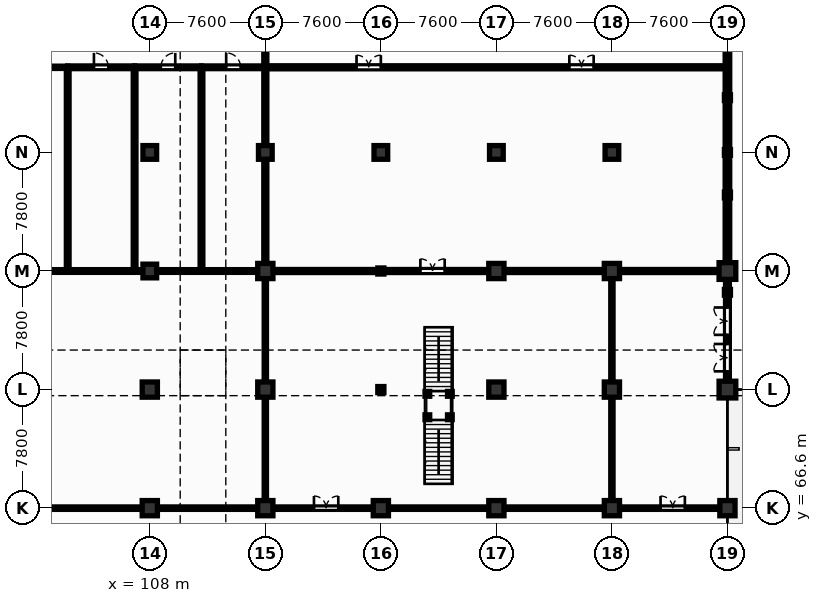
"""IFC4 building model, lengths in metres.
Left out: names, types, materials, properties, quantities, classifications, styles, units other than length and angle.
Written with IfcOpenShell. Run it as: python <this file> out.ifc"""

import sys

from ifc_helpers import new_model, si_unit, direction, frame, frame_2d, origin, origin_2d, place, context, subcontext, project, spatial, rectangle, i_section, extrude, element, fill, save


model = new_model("IFC4")
c1 = context("Model", 3, precision=1e-05, world=origin(), true_north=direction((0.0, 1.0)))
c2 = subcontext(c1, "Body", "Model", "MODEL_VIEW")
j1 = project(units=[si_unit("LENGTHUNIT", "METRE"), si_unit("PLANEANGLEUNIT", "RADIAN")], contexts=[c1])
p1 = place(None, origin())
s1 = spatial("IfcSite", under=j1, at=p1, CompositionType="ELEMENT")
p2 = place(p1, origin())
s2 = spatial("IfcBuilding", under=s1, at=p2, CompositionType="ELEMENT")
p3 = place(p2, origin())
s3 = spatial("IfcBuildingStorey", under=s2, at=p3, CompositionType="ELEMENT", Elevation=0.0)
for number, where, z_axis, x_axis in (
    (1, (108.0, 66.6, 0.0), (0.0, 0.0, 1.0), (1.0, 0.0, 0.0)),
    (2, (108.0, 74.4, 0.0), (0.0, 0.0, 1.0), (1.0, 0.0, 0.0)),
):
    element("IfcColumn", number, at=place(p3, frame(where, z_axis=z_axis, x_axis=x_axis)), inside=s3, PredefinedType="COLUMN", context=c2, shape_type="SweptSolid", body=[
        extrude(rectangle(XDim=1.0, YDim=1.0, at=origin_2d()), origin(), (0.0, 0.0, 1.0), 5.1),
    ])
for number, where, z_axis, x_axis in (
    (3, (108.0, 82.2, 0.0), (0.0, 0.0, 1.0), (1.0, 0.0, 0.0)),
    (4, (108.0, 90.0, 0.0), (0.0, 0.0, 1.0), (1.0, 0.0, 0.0)),
):
    element("IfcColumn", number, at=place(p3, frame(where, z_axis=z_axis, x_axis=x_axis)), inside=s3, PredefinedType="COLUMN", context=c2, shape_type="SweptSolid", body=[
        extrude(rectangle(XDim=0.9, YDim=0.9, at=origin_2d()), origin(), (0.0, 0.0, 1.0), 5.1),
    ])
for number, where, z_axis, x_axis in (
    (5, (115.6, 66.6, 0.0), (0.0, 0.0, 1.0), (1.0, 0.0, 0.0)),
    (6, (115.6, 74.4, 0.0), (0.0, 0.0, 1.0), (1.0, 0.0, 0.0)),
    (7, (115.6, 82.2, 0.0), (0.0, 0.0, 1.0), (1.0, 0.0, 0.0)),
):
    element("IfcColumn", number, at=place(p3, frame(where, z_axis=z_axis, x_axis=x_axis)), inside=s3, PredefinedType="COLUMN", context=c2, shape_type="SweptSolid", body=[
        extrude(rectangle(XDim=1.0, YDim=1.0, at=origin_2d()), origin(), (0.0, 0.0, 1.0), 5.1),
    ])
p4 = place(p3, frame((115.6, 90.0, 0.0), z_axis=(0.0, 0.0, 1.0), x_axis=(1.0, 0.0, 0.0)))
e8 = element("IfcColumn", 8, at=p4, inside=s3, PredefinedType="COLUMN", context=c2, shape_type="SweptSolid", body=[
    extrude(rectangle(XDim=0.9, YDim=0.9, at=origin_2d()), origin(), (0.0, 0.0, 1.0), 5.1),
])
p5 = place(p3, frame((123.2, 66.6, 0.0), z_axis=(0.0, 0.0, 1.0), x_axis=(1.0, 0.0, 0.0)))
e9 = element("IfcColumn", 9, at=p5, inside=s3, PredefinedType="COLUMN", context=c2, shape_type="SweptSolid", body=[
    extrude(rectangle(XDim=1.0, YDim=1.0, at=origin_2d()), origin(), (0.0, 0.0, 1.0), 5.1),
])
for number, where, z_axis, x_axis in (
    (10, (123.2, 74.4, 0.0), (0.0, 0.0, 1.0), (1.0, 0.0, 0.0)),
    (11, (123.2, 82.2, 0.0), (0.0, 0.0, 1.0), (1.0, 0.0, 0.0)),
):
    element("IfcColumn", number, at=place(p3, frame(where, z_axis=z_axis, x_axis=x_axis)), inside=s3, PredefinedType="COLUMN", context=c2, shape_type="SweptSolid", body=[
        extrude(i_section(OverallWidth=0.401, OverallDepth=0.399, WebThickness=0.025, FlangeThickness=0.04, at=origin_2d()), origin(), (0.0, 0.0, 1.0), 5.1),
    ])
p6 = place(p3, frame((123.2, 90.0, 0.0), z_axis=(0.0, 0.0, 1.0), x_axis=(1.0, 0.0, 0.0)))
e12 = element("IfcColumn", 12, at=p6, inside=s3, PredefinedType="COLUMN", context=c2, shape_type="SweptSolid", body=[
    extrude(rectangle(XDim=0.9, YDim=0.9, at=origin_2d()), origin(), (0.0, 0.0, 1.0), 5.1),
])
for number, where, z_axis, x_axis in (
    (13, (130.8, 66.6, 0.0), (0.0, 0.0, 1.0), (1.0, 0.0, 0.0)),
    (14, (130.8, 74.4, 0.0), (0.0, 0.0, 1.0), (1.0, 0.0, 0.0)),
    (15, (130.8, 82.2, 0.0), (0.0, 0.0, 1.0), (1.0, 0.0, 0.0)),
):
    element("IfcColumn", number, at=place(p3, frame(where, z_axis=z_axis, x_axis=x_axis)), inside=s3, PredefinedType="COLUMN", context=c2, shape_type="SweptSolid", body=[
        extrude(rectangle(XDim=1.0, YDim=1.0, at=origin_2d()), origin(), (0.0, 0.0, 1.0), 5.1),
    ])
p7 = place(p3, frame((130.8, 90.0, 0.0), z_axis=(0.0, 0.0, 1.0), x_axis=(1.0, 0.0, 0.0)))
e16 = element("IfcColumn", 16, at=p7, inside=s3, PredefinedType="COLUMN", context=c2, shape_type="SweptSolid", body=[
    extrude(rectangle(XDim=0.9, YDim=0.9, at=origin_2d()), origin(), (0.0, 0.0, 1.0), 5.1),
])
for number, where, z_axis, x_axis in (
    (17, (138.4, 66.6, 0.0), (0.0, 0.0, 1.0), (1.0, 0.0, 0.0)),
    (18, (138.4, 74.4, 0.0), (0.0, 0.0, 1.0), (1.0, 0.0, 0.0)),
    (19, (138.4, 82.2, 0.0), (0.0, 0.0, 1.0), (1.0, 0.0, 0.0)),
):
    element("IfcColumn", number, at=place(p3, frame(where, z_axis=z_axis, x_axis=x_axis)), inside=s3, PredefinedType="COLUMN", context=c2, shape_type="SweptSolid", body=[
        extrude(rectangle(XDim=1.0, YDim=1.0, at=origin_2d()), origin(), (0.0, 0.0, 1.0), 5.1),
    ])
p8 = place(p3, frame((138.4, 90.0, 0.0), z_axis=(0.0, 0.0, 1.0), x_axis=(1.0, 0.0, 0.0)))
e20 = element("IfcColumn", 20, at=p8, inside=s3, PredefinedType="COLUMN", context=c2, shape_type="SweptSolid", body=[
    extrude(rectangle(XDim=0.9, YDim=0.9, at=origin_2d()), origin(), (0.0, 0.0, 1.0), 5.1),
])
p9 = place(p3, frame((146.0, 66.6, 0.0), z_axis=(0.0, 0.0, 1.0), x_axis=(1.0, 0.0, 0.0)))
e21 = element("IfcColumn", 21, at=p9, inside=s3, PredefinedType="COLUMN", context=c2, shape_type="SweptSolid", body=[
    extrude(rectangle(XDim=1.0, YDim=1.0, at=origin_2d()), origin(), (0.0, 0.0, 1.0), 5.1),
])
for number, where, z_axis, x_axis in (
    (22, (146.0, 74.4, 0.0), (0.0, 0.0, 1.0), (1.0, 0.0, 0.0)),
    (23, (146.0, 82.2, 0.0), (0.0, 0.0, 1.0), (1.0, 0.0, 0.0)),
):
    element("IfcColumn", number, at=place(p3, frame(where, z_axis=z_axis, x_axis=x_axis)), inside=s3, PredefinedType="COLUMN", context=c2, shape_type="SweptSolid", body=[
        extrude(rectangle(XDim=1.1, YDim=1.1, at=origin_2d()), origin(), (0.0, 0.0, 1.0), 5.1),
    ])
for number, where, z_axis, x_axis in (
    (24, (146.0, 90.0, 0.0), (0.0, 0.0, 1.0), (1.0, 0.0, 0.0)),
    (25, (146.0, 80.8, 0.0), (0.0, 0.0, 1.0), (1.0, 0.0, 0.0)),
    (26, (146.0, 87.2, 0.0), (0.0, 0.0, 1.0), (1.0, 0.0, 0.0)),
    (27, (146.0, 93.6, 0.0), (0.0, 0.0, 1.0), (1.0, 0.0, 0.0)),
):
    element("IfcColumn", number, at=place(p3, frame(where, z_axis=z_axis, x_axis=x_axis)), inside=s3, PredefinedType="COLUMN", context=c2, shape_type="SweptSolid", body=[
        extrude(i_section(OverallWidth=0.396, OverallDepth=0.381, WebThickness=0.019, FlangeThickness=0.03, at=origin_2d()), origin(), (0.0, 0.0, 1.0), 5.1),
    ])
for number, where, z_axis, x_axis in (
    (28, (126.26, 72.58, 0.0), (0.0, 0.0, 1.0), (1.0, 0.0, 0.0)),
    (29, (127.74, 72.58, 0.0), (0.0, 0.0, 1.0), (1.0, 0.0, 0.0)),
    (30, (126.26, 74.12, 0.0), (0.0, 0.0, 1.0), (1.0, 0.0, 0.0)),
    (31, (127.74, 74.12, 0.0), (0.0, 0.0, 1.0), (1.0, 0.0, 0.0)),
):
    element("IfcColumn", number, at=place(p3, frame(where, z_axis=z_axis, x_axis=x_axis)), inside=s3, PredefinedType="COLUMN", context=c2, shape_type="SweptSolid", body=[
        extrude(i_section(OverallWidth=0.307, OverallDepth=0.315, WebThickness=0.012, FlangeThickness=0.019, at=origin_2d()), origin(), (0.0, 0.0, 1.0), 2.33),
    ])
p10 = place(p3, frame((146.0, 82.2, 0.0), z_axis=(0.0, 0.0, 1.0), x_axis=(0.0, 1.0, 0.0)))
e32 = element("IfcWall", 32, at=p10, inside=s3, PredefinedType="SOLIDWALL", context=c2, shape_type="SweptSolid", body=[
    extrude(rectangle(XDim=31.8, YDim=0.3, at=frame_2d((15.9, 0.0))), origin(), (0.0, 0.0, 1.0), 4.145),
])
p11 = place(p10, frame((24.45, 0.0, 0.0)))
e33 = element("IfcOpeningElement", 33, at=p11, cuts=e32, PredefinedType="OPENING", context=c2, shape_type="SweptSolid", body=[
    extrude(rectangle(XDim=3.2, YDim=3.6, at=frame_2d((1.6, 1.8))), frame((0.0, 0.16, 0.0), z_axis=(0.0, -1.0, 0.0), x_axis=(1.0, 0.0, 0.0)), (0.0, 0.0, 1.0), 0.32),
])
p12 = place(p10, frame((28.0, 0.0, 0.0)))
e34 = element("IfcOpeningElement", 34, at=p12, cuts=e32, PredefinedType="OPENING", context=c2, shape_type="SweptSolid", body=[
    extrude(rectangle(XDim=3.2, YDim=3.6, at=frame_2d((1.6, 1.8))), frame((0.0, 0.16, 0.0), z_axis=(0.0, -1.0, 0.0), x_axis=(1.0, 0.0, 0.0)), (0.0, 0.0, 1.0), 0.32),
])
p13 = place(p3, frame((90.0, 95.6, 0.0), z_axis=(0.0, 0.0, 1.0), x_axis=(1.0, 0.0, 0.0)))
e35 = element("IfcWall", 35, at=p13, inside=s3, PredefinedType="PARTITIONING", context=c2, shape_type="SweptSolid", body=[
    extrude(rectangle(XDim=12.6, YDim=0.15, at=frame_2d((6.3, 0.0))), origin(), (0.0, 0.0, 1.0), 4.8),
])
p14 = place(p13, frame((5.5, 0.0, 0.0)))
e36 = element("IfcOpeningElement", 36, at=p14, cuts=e35, PredefinedType="OPENING", context=c2, shape_type="SweptSolid", body=[
    extrude(rectangle(XDim=1.6, YDim=2.2, at=frame_2d((0.8, 1.1))), frame((0.0, 0.085, 0.0), z_axis=(0.0, -1.0, 0.0), x_axis=(1.0, 0.0, 0.0)), (0.0, 0.0, 1.0), 0.17),
])
p15 = place(p3, frame((102.6, 95.6, 0.0), z_axis=(0.0, 0.0, 1.0), x_axis=(1.0, 0.0, 0.0)))
e37 = element("IfcWall", 37, at=p15, inside=s3, PredefinedType="PLUMBINGWALL", context=c2, shape_type="SweptSolid", body=[
    extrude(rectangle(XDim=4.4, YDim=0.18, at=frame_2d((2.2, 0.0))), origin(), (0.0, 0.0, 1.0), 4.8),
])
p16 = place(p15, frame((1.725, 0.0, 0.0)))
e38 = element("IfcOpeningElement", 38, at=p16, cuts=e37, PredefinedType="OPENING", context=c2, shape_type="SweptSolid", body=[
    extrude(rectangle(XDim=0.95, YDim=2.15, at=frame_2d((0.475, 1.075))), frame((0.0, 0.1, 0.0), z_axis=(0.0, -1.0, 0.0), x_axis=(1.0, 0.0, 0.0)), (0.0, 0.0, 1.0), 0.2),
])
p17 = place(p3, frame((102.6, 82.2, 0.0), z_axis=(0.0, 0.0, 1.0), x_axis=(0.0, 1.0, 0.0)))
e39 = element("IfcWall", 39, at=p17, inside=s3, PredefinedType="PLUMBINGWALL", context=c2, shape_type="SweptSolid", body=[
    extrude(rectangle(XDim=13.4, YDim=0.18, at=frame_2d((6.7, 0.0))), origin(), (0.0, 0.0, 1.0), 4.8),
])
p18 = place(p3, frame((107.0, 95.6, 0.0), z_axis=(0.0, 0.0, 1.0), x_axis=(1.0, 0.0, 0.0)))
e40 = element("IfcWall", 40, at=p18, inside=s3, PredefinedType="PLUMBINGWALL", context=c2, shape_type="SweptSolid", body=[
    extrude(rectangle(XDim=4.4, YDim=0.18, at=frame_2d((2.2, 0.0))), origin(), (0.0, 0.0, 1.0), 4.8),
])
p19 = place(p18, frame((1.725, 0.0, 0.0)))
e41 = element("IfcOpeningElement", 41, at=p19, cuts=e40, PredefinedType="OPENING", context=c2, shape_type="SweptSolid", body=[
    extrude(rectangle(XDim=0.95, YDim=2.15, at=frame_2d((0.475, 1.075))), frame((0.0, 0.1, 0.0), z_axis=(0.0, -1.0, 0.0), x_axis=(1.0, 0.0, 0.0)), (0.0, 0.0, 1.0), 0.2),
])
p20 = place(p3, frame((107.0, 82.2, 0.0), z_axis=(0.0, 0.0, 1.0), x_axis=(0.0, 1.0, 0.0)))
e42 = element("IfcWall", 42, at=p20, inside=s3, PredefinedType="PLUMBINGWALL", context=c2, shape_type="SweptSolid", body=[
    extrude(rectangle(XDim=13.4, YDim=0.18, at=frame_2d((6.7, 0.0))), origin(), (0.0, 0.0, 1.0), 4.8),
])
p21 = place(p3, frame((111.4, 95.6, 0.0), z_axis=(0.0, 0.0, 1.0), x_axis=(1.0, 0.0, 0.0)))
e43 = element("IfcWall", 43, at=p21, inside=s3, PredefinedType="PLUMBINGWALL", context=c2, shape_type="SweptSolid", body=[
    extrude(rectangle(XDim=4.2, YDim=0.18, at=frame_2d((2.1, 0.0))), origin(), (0.0, 0.0, 1.0), 4.8),
])
p22 = place(p21, frame((1.625, 0.0, 0.0)))
e44 = element("IfcOpeningElement", 44, at=p22, cuts=e43, PredefinedType="OPENING", context=c2, shape_type="SweptSolid", body=[
    extrude(rectangle(XDim=0.95, YDim=2.15, at=frame_2d((0.475, 1.075))), frame((0.0, 0.1, 0.0), z_axis=(0.0, -1.0, 0.0), x_axis=(1.0, 0.0, 0.0)), (0.0, 0.0, 1.0), 0.2),
])
p23 = place(p3, frame((111.4, 82.2, 0.0), z_axis=(0.0, 0.0, 1.0), x_axis=(0.0, 1.0, 0.0)))
e45 = element("IfcWall", 45, at=p23, inside=s3, PredefinedType="PLUMBINGWALL", context=c2, shape_type="SweptSolid", body=[
    extrude(rectangle(XDim=13.4, YDim=0.18, at=frame_2d((6.7, 0.0))), origin(), (0.0, 0.0, 1.0), 4.8),
])
p24 = place(p3, frame((115.6, 82.2, 0.0), z_axis=(0.0, 0.0, 1.0), x_axis=(0.0, 1.0, 0.0)))
e46 = element("IfcWall", 46, at=p24, inside=s3, PredefinedType="PARTITIONING", context=c2, shape_type="SweptSolid", body=[
    extrude(rectangle(XDim=31.8, YDim=0.2, at=frame_2d((15.9, 0.0))), origin(), (0.0, 0.0, 1.0), 4.045),
])
p25 = place(p24, frame((18.0, 0.0, 0.0)))
e47 = element("IfcOpeningElement", 47, at=p25, cuts=e46, PredefinedType="OPENING", context=c2, shape_type="SweptSolid", body=[
    extrude(rectangle(XDim=1.6, YDim=2.2, at=frame_2d((0.8, 1.1))), frame((0.0, 0.11, 0.0), z_axis=(0.0, -1.0, 0.0), x_axis=(1.0, 0.0, 0.0)), (0.0, 0.0, 1.0), 0.22),
])
p26 = place(p3, frame((115.6, 95.6, 0.0), z_axis=(0.0, 0.0, 1.0), x_axis=(1.0, 0.0, 0.0)))
e48 = element("IfcWall", 48, at=p26, inside=s3, PredefinedType="PARTITIONING", context=c2, shape_type="SweptSolid", body=[
    extrude(rectangle(XDim=30.4, YDim=0.2, at=frame_2d((15.2, 0.0))), origin(), (0.0, 0.0, 1.0), 4.045),
])
p27 = place(p26, frame((6.0, 0.0, 0.0)))
e49 = element("IfcOpeningElement", 49, at=p27, cuts=e48, PredefinedType="OPENING", context=c2, shape_type="SweptSolid", body=[
    extrude(rectangle(XDim=1.6, YDim=2.2, at=frame_2d((0.8, 1.1))), frame((0.0, 0.11, 0.0), z_axis=(0.0, -1.0, 0.0), x_axis=(1.0, 0.0, 0.0)), (0.0, 0.0, 1.0), 0.22),
])
p28 = place(p26, frame((20.0, 0.0, 0.0)))
e50 = element("IfcOpeningElement", 50, at=p28, cuts=e48, PredefinedType="OPENING", context=c2, shape_type="SweptSolid", body=[
    extrude(rectangle(XDim=1.6, YDim=2.2, at=frame_2d((0.8, 1.1))), frame((0.0, 0.11, 0.0), z_axis=(0.0, -1.0, 0.0), x_axis=(1.0, 0.0, 0.0)), (0.0, 0.0, 1.0), 0.22),
])
p29 = place(p3, frame((90.0, 66.6, 0.0), z_axis=(0.0, 0.0, 1.0), x_axis=(1.0, 0.0, 0.0)))
e51 = element("IfcWall", 51, at=p29, inside=s3, PredefinedType="PARTITIONING", context=c2, shape_type="SweptSolid", body=[
    extrude(rectangle(XDim=25.6, YDim=0.16, at=frame_2d((12.8, 0.0))), origin(), (0.0, 0.0, 1.0), 4.153),
])
p30 = place(p29, frame((3.2, 0.0, 0.0)))
e52 = element("IfcOpeningElement", 52, at=p30, cuts=e51, PredefinedType="OPENING", context=c2, shape_type="SweptSolid", body=[
    extrude(rectangle(XDim=1.6, YDim=2.2, at=frame_2d((0.8, 1.1))), frame((0.0, 0.09, 0.0), z_axis=(0.0, -1.0, 0.0), x_axis=(1.0, 0.0, 0.0)), (0.0, 0.0, 1.0), 0.18),
])
p31 = place(p3, frame((115.6, 66.6, 0.0), z_axis=(0.0, 0.0, 1.0), x_axis=(1.0, 0.0, 0.0)))
e53 = element("IfcWall", 53, at=p31, inside=s3, PredefinedType="PARTITIONING", context=c2, shape_type="SweptSolid", body=[
    extrude(rectangle(XDim=22.8, YDim=0.16, at=frame_2d((11.4, 0.0))), origin(), (0.0, 0.0, 1.0), 4.163),
])
p32 = place(p31, frame((3.2, 0.0, 0.0)))
e54 = element("IfcOpeningElement", 54, at=p32, cuts=e53, PredefinedType="OPENING", context=c2, shape_type="SweptSolid", body=[
    extrude(rectangle(XDim=1.6, YDim=2.2, at=frame_2d((0.8, 1.1))), frame((0.0, 0.09, 0.0), z_axis=(0.0, -1.0, 0.0), x_axis=(1.0, 0.0, 0.0)), (0.0, 0.0, 1.0), 0.18),
])
p33 = place(p3, frame((115.6, 66.6, 0.0), z_axis=(0.0, 0.0, 1.0), x_axis=(0.0, 1.0, 0.0)))
e55 = element("IfcWall", 55, at=p33, inside=s3, PredefinedType="PARTITIONING", context=c2, shape_type="SweptSolid", body=[
    extrude(rectangle(XDim=15.6, YDim=0.15, at=frame_2d((7.8, 0.0))), origin(), (0.0, 0.0, 1.0), 4.163),
])
p34 = place(p3, frame((138.4, 66.6, 0.0), z_axis=(0.0, 0.0, 1.0), x_axis=(1.0, 0.0, 0.0)))
e56 = element("IfcWall", 56, at=p34, inside=s3, PredefinedType="PARTITIONING", context=c2, shape_type="SweptSolid", body=[
    extrude(rectangle(XDim=7.6, YDim=0.16, at=frame_2d((3.8, 0.0))), origin(), (0.0, 0.0, 1.0), 4.163),
])
p35 = place(p34, frame((3.2, 0.0, 0.0)))
e57 = element("IfcOpeningElement", 57, at=p35, cuts=e56, PredefinedType="OPENING", context=c2, shape_type="SweptSolid", body=[
    extrude(rectangle(XDim=1.6, YDim=2.2, at=frame_2d((0.8, 1.1))), frame((0.0, 0.09, 0.0), z_axis=(0.0, -1.0, 0.0), x_axis=(1.0, 0.0, 0.0)), (0.0, 0.0, 1.0), 0.18),
])
p36 = place(p3, frame((138.4, 66.6, 0.0), z_axis=(0.0, 0.0, 1.0), x_axis=(0.0, 1.0, 0.0)))
e58 = element("IfcWall", 58, at=p36, inside=s3, PredefinedType="PARTITIONING", context=c2, shape_type="SweptSolid", body=[
    extrude(rectangle(XDim=15.6, YDim=0.15, at=frame_2d((7.8, 0.0))), origin(), (0.0, 0.0, 1.0), 4.163),
])
p37 = place(p3, frame((146.0, 74.4, 0.0), z_axis=(0.0, 0.0, 1.0), x_axis=(0.0, 1.0, 0.0)))
e59 = element("IfcWall", 59, at=p37, inside=s3, PredefinedType="PARTITIONING", context=c2, shape_type="SweptSolid", body=[
    extrude(rectangle(XDim=7.8, YDim=0.25, at=frame_2d((3.9, 0.0))), origin(), (0.0, 0.0, 1.0), 4.308),
])
p38 = place(p37, frame((1.2, 0.0, 0.0)))
e60 = element("IfcOpeningElement", 60, at=p38, cuts=e59, PredefinedType="OPENING", context=c2, shape_type="SweptSolid", body=[
    extrude(rectangle(XDim=1.8, YDim=2.3, at=frame_2d((0.9, 1.15))), frame((0.0, 0.135, 0.0), z_axis=(0.0, -1.0, 0.0), x_axis=(1.0, 0.0, 0.0)), (0.0, 0.0, 1.0), 0.27),
])
p39 = place(p37, frame((3.6, 0.0, 0.0)))
e61 = element("IfcOpeningElement", 61, at=p39, cuts=e59, PredefinedType="OPENING", context=c2, shape_type="SweptSolid", body=[
    extrude(rectangle(XDim=1.8, YDim=2.3, at=frame_2d((0.9, 1.15))), frame((0.0, 0.135, 0.0), z_axis=(0.0, -1.0, 0.0), x_axis=(1.0, 0.0, 0.0)), (0.0, 0.0, 1.0), 0.27),
])
p40 = place(p3, frame((99.0, 82.2, 0.0), z_axis=(0.0, 0.0, 1.0), x_axis=(1.0, 0.0, 0.0)))
e62 = element("IfcWall", 62, at=p40, inside=s3, PredefinedType="PLUMBINGWALL", context=c2, shape_type="SweptSolid", body=[
    extrude(rectangle(XDim=16.6, YDim=0.18, at=frame_2d((8.3, 0.0))), origin(), (0.0, 0.0, 1.0), 4.153),
])
p41 = place(p3, frame((115.6, 82.2, 0.0), z_axis=(0.0, 0.0, 1.0), x_axis=(1.0, 0.0, 0.0)))
e63 = element("IfcWall", 63, at=p41, inside=s3, PredefinedType="PARTITIONING", context=c2, shape_type="SweptSolid", body=[
    extrude(rectangle(XDim=30.4, YDim=0.2, at=frame_2d((15.2, 0.0))), origin(), (0.0, 0.0, 1.0), 4.308),
])
p42 = place(p41, frame((10.2, 0.0, 0.0)))
e64 = element("IfcOpeningElement", 64, at=p42, cuts=e63, PredefinedType="OPENING", context=c2, shape_type="SweptSolid", body=[
    extrude(rectangle(XDim=1.6, YDim=2.2, at=frame_2d((0.8, 1.1))), frame((0.0, 0.11, 0.0), z_axis=(0.0, -1.0, 0.0), x_axis=(1.0, 0.0, 0.0)), (0.0, 0.0, 1.0), 0.22),
])
p43 = place(p16, origin())
e65 = element("IfcDoor", 65, at=p43, inside=s3, OperationType="SINGLE_SWING_LEFT", PredefinedType="DOOR", context=c2, shape_type="SweptSolid", body=[
    extrude(rectangle(XDim=0.95, YDim=2.15, at=frame_2d((0.475, 1.075))), frame((0.0, 0.025, 0.0), z_axis=(0.0, -1.0, 0.0), x_axis=(1.0, 0.0, 0.0)), (0.0, 0.0, 1.0), 0.05),
])
fill(e38, e65)
p44 = place(p19, origin())
e66 = element("IfcDoor", 66, at=p44, inside=s3, OperationType="SINGLE_SWING_RIGHT", PredefinedType="DOOR", context=c2, shape_type="SweptSolid", body=[
    extrude(rectangle(XDim=0.95, YDim=2.15, at=frame_2d((0.475, 1.075))), frame((0.0, 0.025, 0.0), z_axis=(0.0, -1.0, 0.0), x_axis=(1.0, 0.0, 0.0)), (0.0, 0.0, 1.0), 0.05),
])
fill(e41, e66)
p45 = place(p22, origin())
e67 = element("IfcDoor", 67, at=p45, inside=s3, OperationType="SINGLE_SWING_LEFT", PredefinedType="DOOR", context=c2, shape_type="SweptSolid", body=[
    extrude(rectangle(XDim=0.95, YDim=2.15, at=frame_2d((0.475, 1.075))), frame((0.0, 0.025, 0.0), z_axis=(0.0, -1.0, 0.0), x_axis=(1.0, 0.0, 0.0)), (0.0, 0.0, 1.0), 0.05),
])
fill(e44, e67)
p46 = place(p27, origin())
e68 = element("IfcDoor", 68, at=p46, inside=s3, OperationType="DOUBLE_DOOR_SINGLE_SWING", PredefinedType="DOOR", context=c2, shape_type="SweptSolid", body=[
    extrude(rectangle(XDim=1.6, YDim=2.2, at=frame_2d((0.8, 1.1))), frame((0.0, 0.025, 0.0), z_axis=(0.0, -1.0, 0.0), x_axis=(1.0, 0.0, 0.0)), (0.0, 0.0, 1.0), 0.05),
])
fill(e49, e68)
p47 = place(p28, origin())
e69 = element("IfcDoor", 69, at=p47, inside=s3, OperationType="DOUBLE_DOOR_SINGLE_SWING", PredefinedType="DOOR", context=c2, shape_type="SweptSolid", body=[
    extrude(rectangle(XDim=1.6, YDim=2.2, at=frame_2d((0.8, 1.1))), frame((0.0, 0.025, 0.0), z_axis=(0.0, -1.0, 0.0), x_axis=(1.0, 0.0, 0.0)), (0.0, 0.0, 1.0), 0.05),
])
fill(e50, e69)
p48 = place(p32, origin())
e70 = element("IfcDoor", 70, at=p48, inside=s3, OperationType="DOUBLE_DOOR_SINGLE_SWING", PredefinedType="DOOR", context=c2, shape_type="SweptSolid", body=[
    extrude(rectangle(XDim=1.6, YDim=2.2, at=frame_2d((0.8, 1.1))), frame((0.0, 0.025, 0.0), z_axis=(0.0, -1.0, 0.0), x_axis=(1.0, 0.0, 0.0)), (0.0, 0.0, 1.0), 0.05),
])
fill(e54, e70)
p49 = place(p35, origin())
e71 = element("IfcDoor", 71, at=p49, inside=s3, OperationType="DOUBLE_DOOR_SINGLE_SWING", PredefinedType="DOOR", context=c2, shape_type="SweptSolid", body=[
    extrude(rectangle(XDim=1.6, YDim=2.2, at=frame_2d((0.8, 1.1))), frame((0.0, 0.025, 0.0), z_axis=(0.0, -1.0, 0.0), x_axis=(1.0, 0.0, 0.0)), (0.0, 0.0, 1.0), 0.05),
])
fill(e57, e71)
p50 = place(p38, origin())
e72 = element("IfcDoor", 72, at=p50, inside=s3, OperationType="DOUBLE_DOOR_SINGLE_SWING", PredefinedType="DOOR", context=c2, shape_type="SweptSolid", body=[
    extrude(rectangle(XDim=1.8, YDim=2.3, at=frame_2d((0.9, 1.15))), frame((0.0, 0.025, 0.0), z_axis=(0.0, -1.0, 0.0), x_axis=(1.0, 0.0, 0.0)), (0.0, 0.0, 1.0), 0.05),
])
fill(e60, e72)
p51 = place(p39, origin())
e73 = element("IfcDoor", 73, at=p51, inside=s3, OperationType="DOUBLE_DOOR_SINGLE_SWING", PredefinedType="DOOR", context=c2, shape_type="SweptSolid", body=[
    extrude(rectangle(XDim=1.8, YDim=2.3, at=frame_2d((0.9, 1.15))), frame((0.0, 0.025, 0.0), z_axis=(0.0, -1.0, 0.0), x_axis=(1.0, 0.0, 0.0)), (0.0, 0.0, 1.0), 0.05),
])
fill(e61, e73)
p52 = place(p42, origin())
e74 = element("IfcDoor", 74, at=p52, inside=s3, OperationType="DOUBLE_DOOR_SINGLE_SWING", PredefinedType="DOOR", context=c2, shape_type="SweptSolid", body=[
    extrude(rectangle(XDim=1.6, YDim=2.2, at=frame_2d((0.8, 1.1))), frame((0.0, 0.025, 0.0), z_axis=(0.0, -1.0, 0.0), x_axis=(1.0, 0.0, 0.0)), (0.0, 0.0, 1.0), 0.05),
])
fill(e64, e74)
save(model, sys.argv[1])
